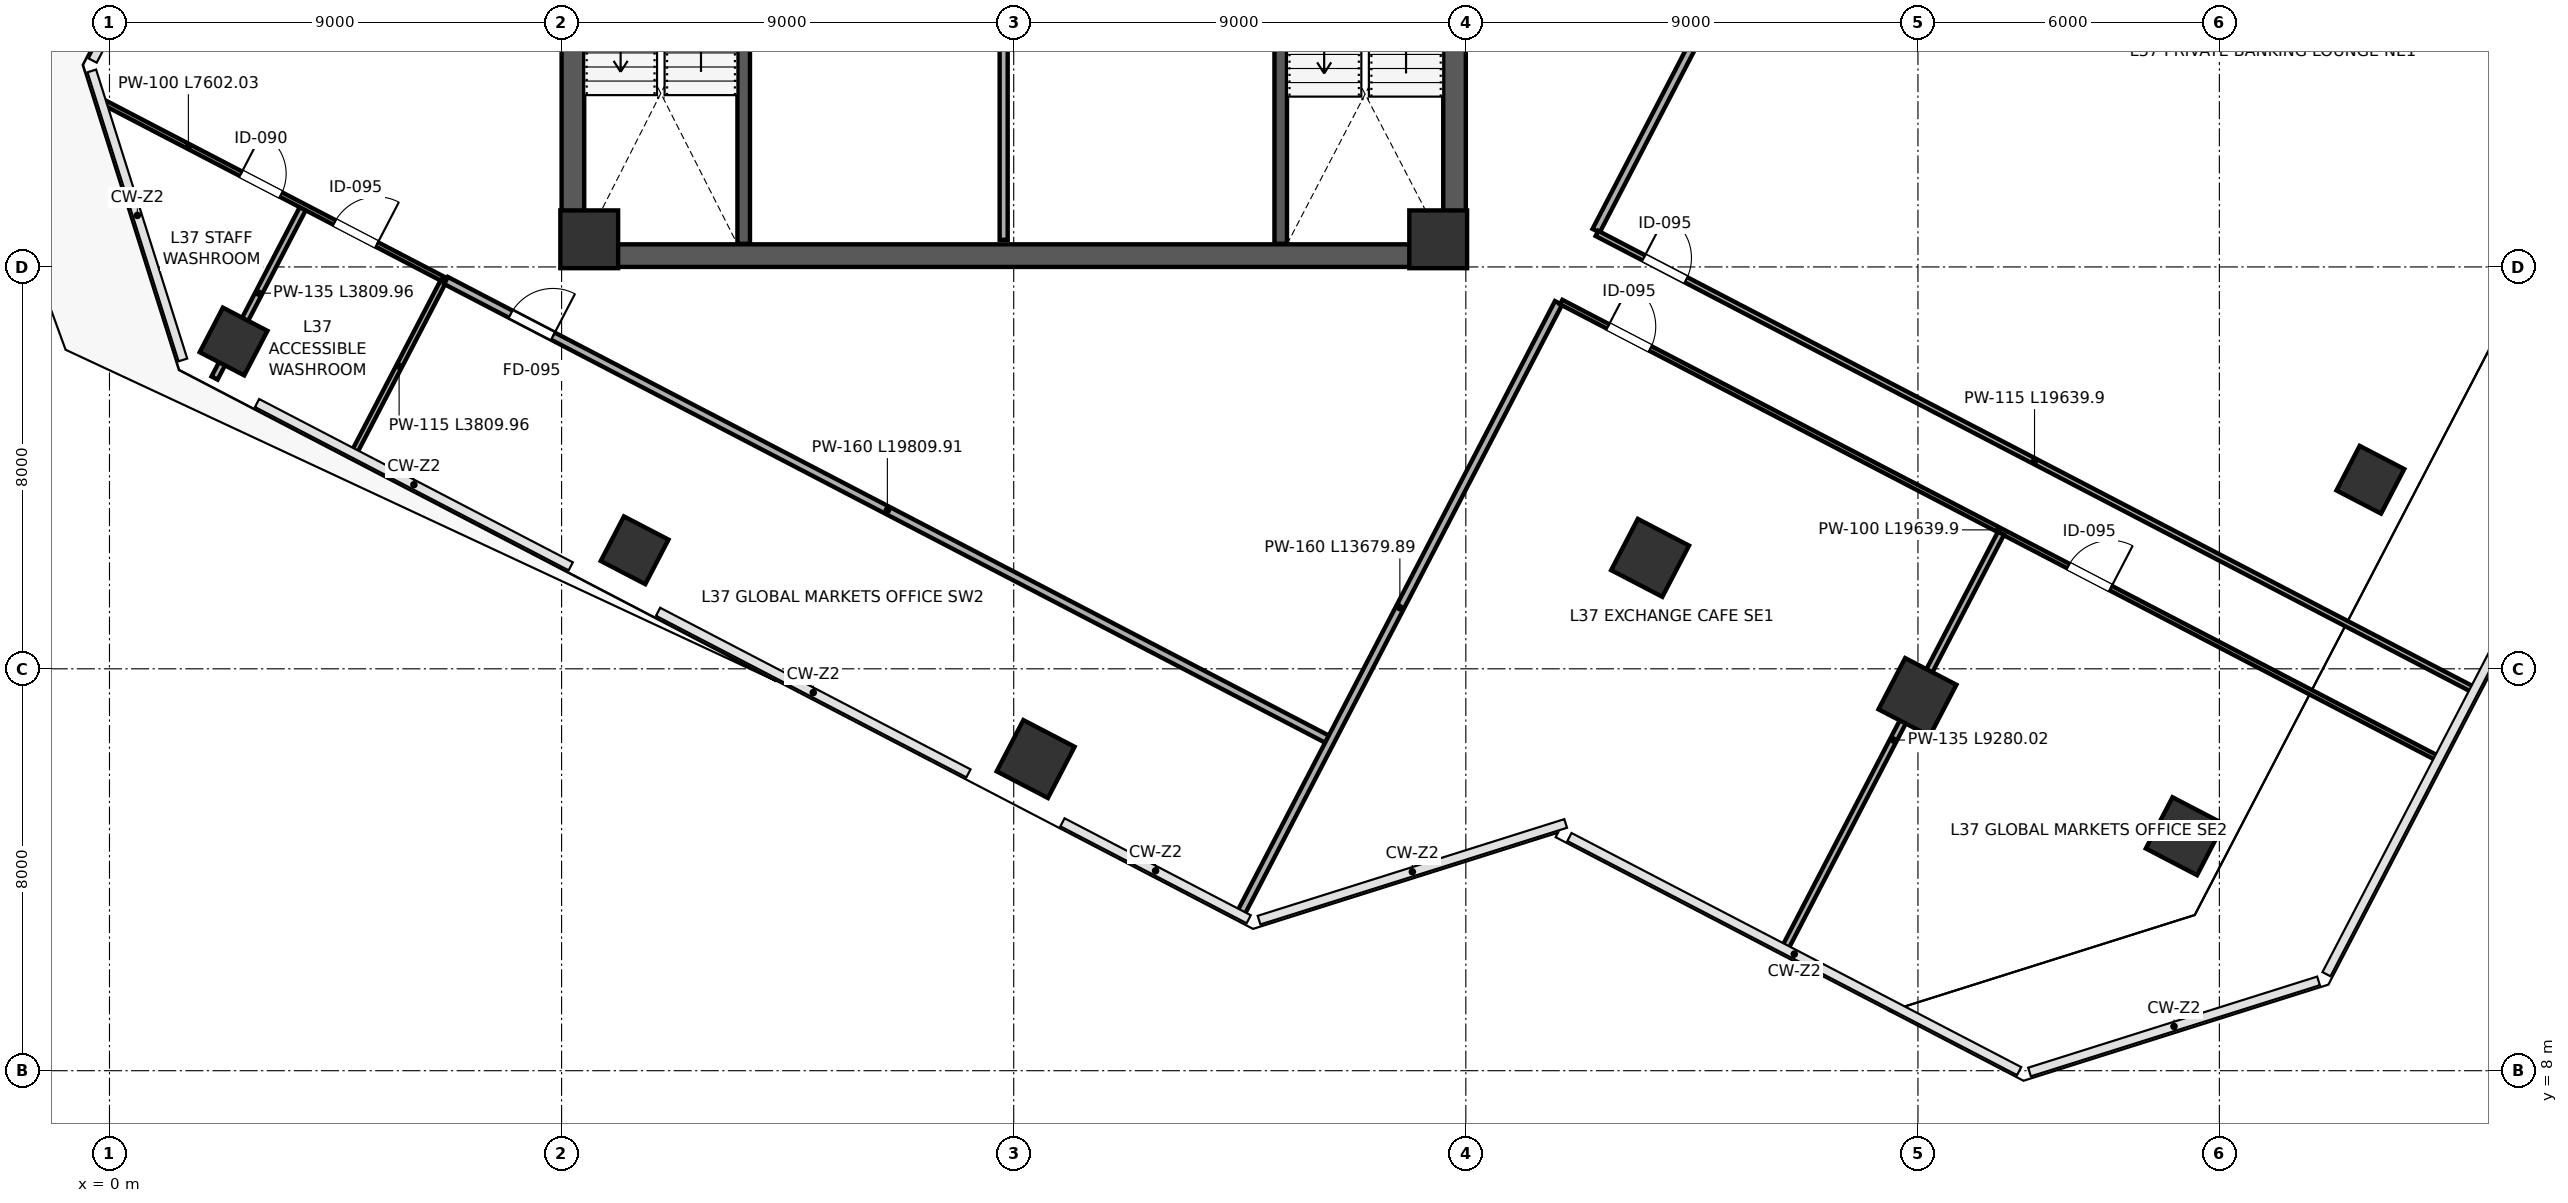
"""IFC4 building model, lengths in metres.
Left out: names, types, materials, properties, quantities, classifications, styles, units other than length and angle.
Written with IfcOpenShell. Run it as: python <this file> out.ifc"""

import sys

from ifc_helpers import new_model, si_unit, direction, frame, frame_2d, origin, origin_2d, place, context, subcontext, project, spatial, rectangle, extrude, source, transform, mapped, element, fill, save


model = new_model("IFC4")
c1 = context("Model", 3, precision=1e-05, world=origin(), true_north=direction((0.0, 1.0)))
c2 = subcontext(c1, "Body", "Model", "MODEL_VIEW")
j1 = project(units=[si_unit("LENGTHUNIT", "METRE"), si_unit("PLANEANGLEUNIT", "RADIAN")], contexts=[c1])
p1 = place(None, origin())
s1 = spatial("IfcSite", under=j1, at=p1, CompositionType="ELEMENT")
p2 = place(p1, origin())
s2 = spatial("IfcBuilding", under=s1, at=p2, CompositionType="ELEMENT")
p3 = place(p2, frame((0.0, 0.0, 166.6)))
s3 = spatial("IfcBuildingStorey", under=s2, at=p3, CompositionType="ELEMENT", Elevation=166.6)
m1 = source(origin(), c2, "Body", "SweptSolid", [
    extrude(rectangle(XDim=1.15, YDim=1.15, at=origin_2d()), origin(), (0.0, 0.0, 1.0), 4.198),
])
for number, where, z_axis, x_axis in (
    (1, (9.55, 24.55, 0.001), (0.0, 0.0, 1.0), (1.0, 0.0, 0.0)),
    (2, (26.45, 24.55, 0.001), (0.0, 0.0, 1.0), (1.0, 0.0, 0.0)),
):
    element("IfcColumn", number, at=place(p3, frame(where, z_axis=z_axis, x_axis=x_axis)), inside=s3, PredefinedType="COLUMN", context=c2, shape_type="MappedRepresentation", body=[
        mapped(m1, transform((0.0, 0.0, 0.0), scale=1.0)),
    ])
m2 = source(origin(), c2, "Body", "SweptSolid", [
    extrude(rectangle(XDim=1.0, YDim=1.0, at=origin_2d()), origin(), (0.0, 0.0, 1.0), 4.198),
])
for number, where, z_axis, x_axis in (
    (3, (2.47, 22.515, 0.001), (0.0, 0.0, 1.0), (-0.887, 0.462, 0.0)),
    (4, (10.453, 18.36, 0.001), (0.0, 0.0, 1.0), (-0.887, 0.462, 0.0)),
):
    element("IfcColumn", number, at=place(p3, frame(where, z_axis=z_axis, x_axis=x_axis)), inside=s3, PredefinedType="COLUMN", context=c2, shape_type="MappedRepresentation", body=[
        mapped(m2, transform((0.0, 0.0, 0.0), scale=1.0)),
    ])
m3 = source(origin(), c2, "Body", "SweptSolid", [
    extrude(rectangle(XDim=1.15, YDim=1.15, at=origin_2d()), origin(), (0.0, 0.0, 1.0), 4.198),
])
p4 = place(p3, frame((18.437, 14.204, 0.001), z_axis=(0.0, 0.0, 1.0), x_axis=(-0.887010833178, 0.461748613235, 0.0)))
e5 = element("IfcColumn", 5, at=p4, inside=s3, PredefinedType="COLUMN", context=c2, shape_type="MappedRepresentation", body=[
    mapped(m3, transform((0.0, 0.0, 0.0), scale=1.0)),
])
for number, where, z_axis, x_axis in (
    (6, (30.668, 18.208, 0.001), (0.0, 0.0, 1.0), (-0.887, 0.462, 0.0)),
    (7, (35.99, 15.438, 0.001), (0.0, 0.0, 1.0), (-0.887, 0.462, 0.0)),
):
    element("IfcColumn", number, at=place(p3, frame(where, z_axis=z_axis, x_axis=x_axis)), inside=s3, PredefinedType="COLUMN", context=c2, shape_type="MappedRepresentation", body=[
        mapped(m1, transform((0.0, 0.0, 0.0), scale=1.0)),
    ])
p5 = place(p3, frame((41.312, 12.667, 0.001), z_axis=(0.0, 0.0, 1.0), x_axis=(-0.887010833178, 0.461748613235, 0.0)))
e8 = element("IfcColumn", 8, at=p5, inside=s3, PredefinedType="COLUMN", context=c2, shape_type="MappedRepresentation", body=[
    mapped(m3, transform((0.0, 0.0, 0.0), scale=1.0)),
])
p6 = place(p3, frame((45.006, 19.764, 0.001), z_axis=(0.0, 0.0, 1.0), x_axis=(-0.887010833178, 0.461748613235, 0.0)))
e9 = element("IfcColumn", 9, at=p6, inside=s3, PredefinedType="COLUMN", context=c2, shape_type="MappedRepresentation", body=[
    mapped(m2, transform((0.0, 0.0, 0.0), scale=1.0)),
])
p7 = place(p3, frame((9.225, 24.45, 0.0), z_axis=(0.0, 0.0, 1.0), x_axis=(0.0, 1.0, 0.0)))
e10 = element("IfcWall", 10, at=p7, inside=s3, PredefinedType="SHEAR", context=c2, shape_type="SweptSolid", body=[
    extrude(rectangle(XDim=15.1, YDim=0.45, at=frame_2d((7.55, 0.0))), origin(), (0.0, 0.0, 1.0), 3.96),
])
p8 = place(p3, frame((26.775, 24.45, 0.0), z_axis=(0.0, 0.0, 1.0), x_axis=(0.0, 1.0, 0.0)))
e11 = element("IfcWall", 11, at=p8, inside=s3, PredefinedType="SHEAR", context=c2, shape_type="SweptSolid", body=[
    extrude(rectangle(XDim=15.1, YDim=0.45, at=frame_2d((7.55, 0.0))), origin(), (0.0, 0.0, 1.0), 3.96),
])
p9 = place(p8, frame((8.6, 0.0, 0.0)))
e12 = element("IfcOpeningElement", 12, at=p9, cuts=e11, PredefinedType="OPENING", context=c2, shape_type="SweptSolid", body=[
    extrude(rectangle(XDim=1.15, YDim=2.2, at=frame_2d((0.575, 1.1))), frame((0.0, 0.235, 0.0), z_axis=(0.0, -1.0, 0.0), x_axis=(1.0, 0.0, 0.0)), (0.0, 0.0, 1.0), 0.47),
])
p10 = place(p3, frame((9.0, 24.225, 0.0), z_axis=(0.0, 0.0, 1.0), x_axis=(1.0, 0.0, 0.0)))
e13 = element("IfcWall", 13, at=p10, inside=s3, PredefinedType="SHEAR", context=c2, shape_type="SweptSolid", body=[
    extrude(rectangle(XDim=18.0, YDim=0.45, at=frame_2d((9.0, 0.0))), origin(), (0.0, 0.0, 1.0), 3.96),
])
p11 = place(p3, frame((12.625, 24.46, 0.0), z_axis=(0.0, 0.0, 1.0), x_axis=(0.0, 1.0, 0.0)))
e14 = element("IfcWall", 14, at=p11, inside=s3, PredefinedType="SHEAR", context=c2, shape_type="SweptSolid", body=[
    extrude(rectangle(XDim=7.49, YDim=0.25, at=frame_2d((3.745, 0.0))), origin(), (0.0, 0.0, 1.0), 3.96),
])
p12 = place(p11, frame((5.85, 0.0, 0.0)))
e15 = element("IfcOpeningElement", 15, at=p12, cuts=e14, PredefinedType="OPENING", context=c2, shape_type="SweptSolid", body=[
    extrude(rectangle(XDim=1.15, YDim=2.2, at=frame_2d((0.575, 1.1))), frame((0.0, 0.135, 0.0), z_axis=(0.0, -1.0, 0.0), x_axis=(1.0, 0.0, 0.0)), (0.0, 0.0, 1.0), 0.27),
])
p13 = place(p3, frame((23.315, 24.46, 0.0), z_axis=(0.0, 0.0, 1.0), x_axis=(0.0, 1.0, 0.0)))
e16 = element("IfcWall", 16, at=p13, inside=s3, PredefinedType="SHEAR", context=c2, shape_type="SweptSolid", body=[
    extrude(rectangle(XDim=7.49, YDim=0.25, at=frame_2d((3.745, 0.0))), origin(), (0.0, 0.0, 1.0), 3.96),
])
p14 = place(p3, frame((17.8, 24.54, 0.0), z_axis=(0.0, 0.0, 1.0), x_axis=(0.0, 1.0, 0.0)))
e17 = element("IfcWall", 17, at=p14, inside=s3, PredefinedType="PARTITIONING", context=c2, shape_type="SweptSolid", body=[
    extrude(rectangle(XDim=4.6, YDim=0.16, at=frame_2d((2.3, 0.0))), origin(), (0.0, 0.0, 1.0), 3.96),
])
p15 = place(p3, frame((2.092, 21.788, 0.0), z_axis=(0.0, 0.0, 1.0), x_axis=(0.461687624356, 0.887042579314, 0.0)))
e18 = element("IfcWall", 18, at=p15, inside=s3, PredefinedType="PARTITIONING", context=c2, shape_type="SweptSolid", body=[
    extrude(rectangle(XDim=3.81, YDim=0.135, at=frame_2d((1.905, 0.0))), origin(), (0.0, 0.0, 1.0), 3.195),
])
p16 = place(p3, frame((4.886, 20.333, 0.0), z_axis=(0.0, 0.0, 1.0), x_axis=(0.461764287366, 0.887002673566, 0.0)))
e19 = element("IfcWall", 19, at=p16, inside=s3, PredefinedType="PARTITIONING", context=c2, shape_type="SweptSolid", body=[
    extrude(rectangle(XDim=3.81, YDim=0.115, at=frame_2d((1.905, 0.0))), origin(), (0.0, 0.0, 1.0), 3.195),
])
p17 = place(p3, frame((-0.115, 27.277, 0.0), z_axis=(0.0, 0.0, 1.0), x_axis=(0.887004800346, -0.461760202012, 0.0)))
e20 = element("IfcWall", 20, at=p17, inside=s3, PredefinedType="PARTITIONING", context=c2, shape_type="SweptSolid", body=[
    extrude(rectangle(XDim=7.602, YDim=0.1, at=frame_2d((3.801, 0.0))), origin(), (0.0, 0.0, 1.0), 3.96),
])
p18 = place(p17, frame((3.08, 0.0, 0.0)))
e21 = element("IfcOpeningElement", 21, at=p18, cuts=e20, PredefinedType="OPENING", context=c2, shape_type="SweptSolid", body=[
    extrude(rectangle(XDim=0.9, YDim=2.15, at=frame_2d((0.45, 1.075))), frame((0.0, 0.06, 0.0), z_axis=(0.0, -1.0, 0.0), x_axis=(1.0, 0.0, 0.0)), (0.0, 0.0, 1.0), 0.12),
])
p19 = place(p17, frame((5.18, 0.0, 0.0)))
e22 = element("IfcOpeningElement", 22, at=p19, cuts=e20, PredefinedType="OPENING", context=c2, shape_type="SweptSolid", body=[
    extrude(rectangle(XDim=0.95, YDim=2.15, at=frame_2d((0.475, 1.075))), frame((0.0, 0.06, 0.0), z_axis=(0.0, -1.0, 0.0), x_axis=(1.0, 0.0, 0.0)), (0.0, 0.0, 1.0), 0.12),
])
p20 = place(p3, frame((6.699, 23.73, 0.0), z_axis=(0.0, 0.0, 1.0), x_axis=(0.887009683963, -0.46175082085, 0.0)))
e23 = element("IfcWall", 23, at=p20, inside=s3, PredefinedType="PARTITIONING", context=c2, shape_type="SweptSolid", body=[
    extrude(rectangle(XDim=19.81, YDim=0.16, at=frame_2d((9.905, 0.0))), origin(), (0.0, 0.0, 1.0), 3.96),
])
p21 = place(p20, frame((1.45, 0.0, 0.0)))
e24 = element("IfcOpeningElement", 24, at=p21, cuts=e23, PredefinedType="OPENING", context=c2, shape_type="SweptSolid", body=[
    extrude(rectangle(XDim=0.95, YDim=2.15, at=frame_2d((0.475, 1.075))), frame((0.0, 0.09, 0.0), z_axis=(0.0, -1.0, 0.0), x_axis=(1.0, 0.0, 0.0)), (0.0, 0.0, 1.0), 0.18),
])
p22 = place(p3, frame((29.593, 24.72, 0.0), z_axis=(0.0, 0.0, 1.0), x_axis=(0.461745249096, 0.88701258443, 0.0)))
e25 = element("IfcWall", 25, at=p22, inside=s3, PredefinedType="PARTITIONING", context=c2, shape_type="SweptSolid", body=[
    extrude(rectangle(XDim=18.74, YDim=0.16, at=frame_2d((9.37, 0.0))), origin(), (0.0, 0.0, 1.0), 3.195),
])
p23 = place(p3, frame((22.528, 11.149, 0.0), z_axis=(0.0, 0.0, 1.0), x_axis=(0.461766825398, 0.887001352289, 0.0)))
e26 = element("IfcWall", 26, at=p23, inside=s3, PredefinedType="PARTITIONING", context=c2, shape_type="SweptSolid", body=[
    extrude(rectangle(XDim=13.68, YDim=0.16, at=frame_2d((6.84, 0.0))), origin(), (0.0, 0.0, 1.0), 3.96),
])
p24 = place(p3, frame((29.61, 24.667, 0.0), z_axis=(0.0, 0.0, 1.0), x_axis=(0.887013798673, -0.461742916527, 0.0)))
e27 = element("IfcWall", 27, at=p24, inside=s3, PredefinedType="PARTITIONING", context=c2, shape_type="SweptSolid", body=[
    extrude(rectangle(XDim=19.64, YDim=0.115, at=frame_2d((9.82, 0.0))), origin(), (0.0, 0.0, 1.0), 3.252),
])
p25 = place(p24, frame((1.05, 0.0, 0.0)))
e28 = element("IfcOpeningElement", 28, at=p25, cuts=e27, PredefinedType="OPENING", context=c2, shape_type="SweptSolid", body=[
    extrude(rectangle(XDim=0.95, YDim=2.15, at=frame_2d((0.475, 1.075))), frame((0.0, 0.067, 0.0), z_axis=(0.0, -1.0, 0.0), x_axis=(1.0, 0.0, 0.0)), (0.0, 0.0, 1.0), 0.135),
])
p26 = place(p3, frame((28.899, 23.301, 0.0), z_axis=(0.0, 0.0, 1.0), x_axis=(0.887006056854, -0.461757788353, 0.0)))
e29 = element("IfcWall", 29, at=p26, inside=s3, PredefinedType="PARTITIONING", context=c2, shape_type="SweptSolid", body=[
    extrude(rectangle(XDim=19.64, YDim=0.1, at=frame_2d((9.82, 0.0))), origin(), (0.0, 0.0, 1.0), 3.252),
])
p27 = place(p26, frame((1.05, 0.0, 0.0)))
e30 = element("IfcOpeningElement", 30, at=p27, cuts=e29, PredefinedType="OPENING", context=c2, shape_type="SweptSolid", body=[
    extrude(rectangle(XDim=0.95, YDim=2.15, at=frame_2d((0.475, 1.075))), frame((0.0, 0.06, 0.0), z_axis=(0.0, -1.0, 0.0), x_axis=(1.0, 0.0, 0.0)), (0.0, 0.0, 1.0), 0.12),
])
p28 = place(p26, frame((11.38, 0.0, 0.0)))
e31 = element("IfcOpeningElement", 31, at=p28, cuts=e29, PredefinedType="OPENING", context=c2, shape_type="SweptSolid", body=[
    extrude(rectangle(XDim=0.95, YDim=2.15, at=frame_2d((0.475, 1.075))), frame((0.0, 0.06, 0.0), z_axis=(0.0, -1.0, 0.0), x_axis=(1.0, 0.0, 0.0)), (0.0, 0.0, 1.0), 0.12),
])
p29 = place(p3, frame((33.368, 10.467, 0.0), z_axis=(0.0, 0.0, 1.0), x_axis=(0.461728758034, 0.887021168859, 0.0)))
e32 = element("IfcWall", 32, at=p29, inside=s3, PredefinedType="PARTITIONING", context=c2, shape_type="SweptSolid", body=[
    extrude(rectangle(XDim=9.28, YDim=0.135, at=frame_2d((4.64, 0.0))), origin(), (0.0, 0.0, 1.0), 3.96),
])
m4 = source(origin(), c2, "Body", "SweptSolid", [
    extrude(rectangle(XDim=0.9, YDim=2.15, at=frame_2d((0.45, 1.075))), frame((0.0, 0.025, 0.0), z_axis=(0.0, -1.0, 0.0), x_axis=(1.0, 0.0, 0.0)), (0.0, 0.0, 1.0), 0.05),
])
p30 = place(p18, origin())
e33 = element("IfcDoor", 33, at=p30, inside=s3, OperationType="SINGLE_SWING_LEFT", PredefinedType="DOOR", context=c2, shape_type="MappedRepresentation", body=[
    mapped(m4, transform((0.0, 0.0, 0.0), scale=1.0)),
])
fill(e21, e33)
m5 = source(origin(), c2, "Body", "SweptSolid", [
    extrude(rectangle(XDim=0.95, YDim=2.15, at=frame_2d((0.475, 1.075))), frame((0.0, 0.025, 0.0), z_axis=(0.0, -1.0, 0.0), x_axis=(1.0, 0.0, 0.0)), (0.0, 0.0, 1.0), 0.05),
])
p31 = place(p19, origin())
e34 = element("IfcDoor", 34, at=p31, inside=s3, OperationType="SINGLE_SWING_RIGHT", PredefinedType="DOOR", context=c2, shape_type="MappedRepresentation", body=[
    mapped(m5, transform((0.0, 0.0, 0.0), scale=1.0)),
])
fill(e22, e34)
m6 = source(origin(), c2, "Body", "SweptSolid", [
    extrude(rectangle(XDim=0.95, YDim=2.15, at=frame_2d((0.475, 1.075))), frame((0.0, 0.025, 0.0), z_axis=(0.0, -1.0, 0.0), x_axis=(1.0, 0.0, 0.0)), (0.0, 0.0, 1.0), 0.05),
])
p32 = place(p21, origin())
e35 = element("IfcDoor", 35, at=p32, inside=s3, OperationType="SINGLE_SWING_RIGHT", PredefinedType="DOOR", context=c2, shape_type="MappedRepresentation", body=[
    mapped(m6, transform((0.0, 0.0, 0.0), scale=1.0)),
])
fill(e24, e35)
p33 = place(p25, origin())
e36 = element("IfcDoor", 36, at=p33, inside=s3, OperationType="SINGLE_SWING_LEFT", PredefinedType="DOOR", context=c2, shape_type="MappedRepresentation", body=[
    mapped(m5, transform((0.0, 0.0, 0.0), scale=1.0)),
])
fill(e28, e36)
p34 = place(p27, origin())
e37 = element("IfcDoor", 37, at=p34, inside=s3, OperationType="SINGLE_SWING_LEFT", PredefinedType="DOOR", context=c2, shape_type="MappedRepresentation", body=[
    mapped(m5, transform((0.0, 0.0, 0.0), scale=1.0)),
])
fill(e30, e37)
p35 = place(p28, origin())
e38 = element("IfcDoor", 38, at=p35, inside=s3, OperationType="SINGLE_SWING_RIGHT", PredefinedType="DOOR", context=c2, shape_type="MappedRepresentation", body=[
    mapped(m5, transform((0.0, 0.0, 0.0), scale=1.0)),
])
fill(e31, e38)
save(model, sys.argv[1])
